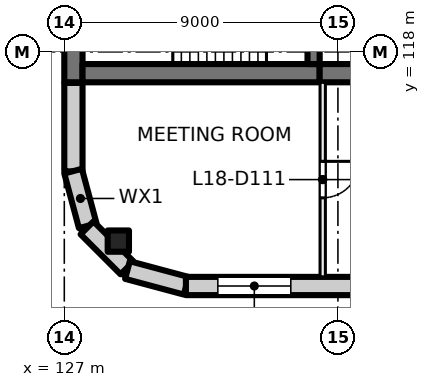
"""IFC4 building model, lengths in metres.
Left out: names, types, materials, properties, quantities, classifications, styles, units other than length and angle.
Written with IfcOpenShell. Run it as: python <this file> out.ifc"""

import sys

from ifc_helpers import new_model, si_unit, direction, frame, frame_2d, origin, origin_2d, place, context, subcontext, project, spatial, rectangle, extrude, element, fill, save


model = new_model("IFC4")
c1 = context("Model", 3, precision=1e-05, world=origin(), true_north=direction((0.0, 1.0)))
c2 = subcontext(c1, "Body", "Model", "MODEL_VIEW")
j1 = project(units=[si_unit("LENGTHUNIT", "METRE"), si_unit("PLANEANGLEUNIT", "RADIAN")], contexts=[c1])
p1 = place(None, origin())
s1 = spatial("IfcSite", under=j1, at=p1, CompositionType="ELEMENT")
p2 = place(p1, origin())
s2 = spatial("IfcBuilding", under=s1, at=p2, CompositionType="ELEMENT")
p3 = place(p2, frame((0.0, 0.0, 81.0)))
s3 = spatial("IfcBuildingStorey", under=s2, at=p3, CompositionType="ELEMENT", Elevation=81.0)
p4 = place(p3, frame((128.777, 111.777, 0.0), z_axis=(0.0, 0.0, 1.0), x_axis=(1.0, 0.0, 0.0)))
e1 = element("IfcColumn", 1, at=p4, inside=s3, PredefinedType="COLUMN", context=c2, shape_type="SweptSolid", body=[
    extrude(rectangle(XDim=0.7, YDim=0.7, at=origin_2d()), origin(), (0.0, 0.0, 1.0), 4.0),
])
p5 = place(p3, frame((127.3, 117.0, 0.0), z_axis=(0.0, 0.0, 1.0), x_axis=(0.0, 1.0, 0.0)))
e2 = element("IfcWall", 2, at=p5, inside=s3, PredefinedType="SHEAR", context=c2, shape_type="SweptSolid", body=[
    extrude(rectangle(XDim=3.8, YDim=0.6, at=frame_2d((1.9, 0.0))), origin(), (0.0, 0.0, 1.0), 4.0),
])
p6 = place(p3, frame((127.6, 117.3, 0.0), z_axis=(0.0, 0.0, 1.0), x_axis=(1.0, 0.0, 0.0)))
e3 = element("IfcWall", 3, at=p6, inside=s3, PredefinedType="SHEAR", context=c2, shape_type="SweptSolid", body=[
    extrude(rectangle(XDim=7.8, YDim=0.6, at=frame_2d((3.9, 0.0))), origin(), (0.0, 0.0, 1.0), 4.0),
])
p7 = place(p3, frame((135.4, 117.3, 0.0), z_axis=(0.0, 0.0, 1.0), x_axis=(1.0, 0.0, 0.0)))
e4 = element("IfcWall", 4, at=p7, inside=s3, PredefinedType="SHEAR", context=c2, shape_type="SweptSolid", body=[
    extrude(rectangle(XDim=4.6, YDim=0.6, at=frame_2d((2.3, 0.0))), origin(), (0.0, 0.0, 1.0), 4.0),
])
p8 = place(p3, frame((135.2, 117.6, 0.0), z_axis=(0.0, 0.0, 1.0), x_axis=(0.0, 1.0, 0.0)))
e5 = element("IfcWall", 5, at=p8, inside=s3, PredefinedType="SHEAR", context=c2, shape_type="SweptSolid", body=[
    extrude(rectangle(XDim=2.8, YDim=0.4, at=frame_2d((1.4, 0.0))), origin(), (0.0, 0.0, 1.0), 4.0),
])
p9 = place(p8, frame((0.9, 0.0, 0.0)))
e6 = element("IfcOpeningElement", 6, at=p9, cuts=e5, PredefinedType="OPENING", context=c2, shape_type="SweptSolid", body=[
    extrude(rectangle(XDim=1.0, YDim=2.1, at=frame_2d((0.5, 1.05))), frame((0.0, 0.21, 0.0), z_axis=(0.0, -1.0, 0.0), x_axis=(1.0, 0.0, 0.0)), (0.0, 0.0, 1.0), 0.42),
])
p10 = place(p3, frame((127.3, 114.07, 0.0), z_axis=(0.0, 0.0, 1.0), x_axis=(0.0, 1.0, 0.0)))
e7 = element("IfcWall", 7, at=p10, inside=s3, PredefinedType="SOLIDWALL", context=c2, shape_type="SweptSolid", body=[
    extrude(rectangle(XDim=2.91, YDim=0.6, at=frame_2d((1.455, 0.0))), origin(), (0.0, 0.0, 1.0), 3.625),
])
for number, where, z_axis, x_axis in (
    (8, (127.771, 112.281, 0.0), (0.0, 0.0, 1.0), (-0.259, 0.966, 0.0)),
    (9, (129.064, 110.896, 0.0), (0.0, 0.0, 1.0), (-0.707, 0.707, 0.0)),
):
    element("IfcWall", number, at=place(p3, frame(where, z_axis=z_axis, x_axis=x_axis)), inside=s3, PredefinedType="SOLIDWALL", context=c2, shape_type="SweptSolid", body=[
        extrude(rectangle(XDim=1.861, YDim=0.6, at=frame_2d((0.93, 0.0))), origin(), (0.0, 0.0, 1.0), 3.625),
    ])
p11 = place(p3, frame((131.01, 110.308, 0.0), z_axis=(0.0, 0.0, 1.0), x_axis=(-0.965920269068, 0.258839784042, 0.0)))
e10 = element("IfcWall", 10, at=p11, inside=s3, PredefinedType="SOLIDWALL", context=c2, shape_type="SweptSolid", body=[
    extrude(rectangle(XDim=2.0, YDim=0.6, at=frame_2d((1.0, 0.0))), origin(), (0.0, 0.0, 1.0), 3.625),
])
p12 = place(p3, frame((162.93, 110.3, 0.0), z_axis=(0.0, 0.0, 1.0), x_axis=(-1.0, 0.0, 0.0)))
e11 = element("IfcWall", 11, at=p12, inside=s3, PredefinedType="SOLIDWALL", context=c2, shape_type="SweptSolid", body=[
    extrude(rectangle(XDim=31.93, YDim=0.6, at=frame_2d((15.965, 0.0))), origin(), (0.0, 0.0, 1.0), 3.625),
])
p13 = place(p12, frame((1.48, 0.0, 0.9)))
e12 = element("IfcOpeningElement", 12, at=p13, cuts=e11, PredefinedType="OPENING", context=c2, shape_type="SweptSolid", body=[
    extrude(rectangle(XDim=2.4, YDim=2.4, at=frame_2d((1.2, 1.2))), frame((0.0, 0.31, 0.0), z_axis=(0.0, -1.0, 0.0), x_axis=(1.0, 0.0, 0.0)), (0.0, 0.0, 1.0), 0.62),
])
p14 = place(p12, frame((5.98, 0.0, 0.9)))
e13 = element("IfcOpeningElement", 13, at=p14, cuts=e11, PredefinedType="OPENING", context=c2, shape_type="SweptSolid", body=[
    extrude(rectangle(XDim=2.4, YDim=2.4, at=frame_2d((1.2, 1.2))), frame((0.0, 0.31, 0.0), z_axis=(0.0, -1.0, 0.0), x_axis=(1.0, 0.0, 0.0)), (0.0, 0.0, 1.0), 0.62),
])
p15 = place(p12, frame((10.48, 0.0, 0.9)))
e14 = element("IfcOpeningElement", 14, at=p15, cuts=e11, PredefinedType="OPENING", context=c2, shape_type="SweptSolid", body=[
    extrude(rectangle(XDim=2.4, YDim=2.4, at=frame_2d((1.2, 1.2))), frame((0.0, 0.31, 0.0), z_axis=(0.0, -1.0, 0.0), x_axis=(1.0, 0.0, 0.0)), (0.0, 0.0, 1.0), 0.62),
])
p16 = place(p12, frame((14.98, 0.0, 0.9)))
e15 = element("IfcOpeningElement", 15, at=p16, cuts=e11, PredefinedType="OPENING", context=c2, shape_type="SweptSolid", body=[
    extrude(rectangle(XDim=2.4, YDim=2.4, at=frame_2d((1.2, 1.2))), frame((0.0, 0.31, 0.0), z_axis=(0.0, -1.0, 0.0), x_axis=(1.0, 0.0, 0.0)), (0.0, 0.0, 1.0), 0.62),
])
p17 = place(p12, frame((19.48, 0.0, 0.9)))
e16 = element("IfcOpeningElement", 16, at=p17, cuts=e11, PredefinedType="OPENING", context=c2, shape_type="SweptSolid", body=[
    extrude(rectangle(XDim=2.4, YDim=2.4, at=frame_2d((1.2, 1.2))), frame((0.0, 0.31, 0.0), z_axis=(0.0, -1.0, 0.0), x_axis=(1.0, 0.0, 0.0)), (0.0, 0.0, 1.0), 0.62),
])
p18 = place(p12, frame((23.98, 0.0, 0.9)))
e17 = element("IfcOpeningElement", 17, at=p18, cuts=e11, PredefinedType="OPENING", context=c2, shape_type="SweptSolid", body=[
    extrude(rectangle(XDim=2.4, YDim=2.4, at=frame_2d((1.2, 1.2))), frame((0.0, 0.31, 0.0), z_axis=(0.0, -1.0, 0.0), x_axis=(1.0, 0.0, 0.0)), (0.0, 0.0, 1.0), 0.62),
])
p19 = place(p12, frame((28.48, 0.0, 0.9)))
e18 = element("IfcOpeningElement", 18, at=p19, cuts=e11, PredefinedType="OPENING", context=c2, shape_type="SweptSolid", body=[
    extrude(rectangle(XDim=2.4, YDim=2.4, at=frame_2d((1.2, 1.2))), frame((0.0, 0.31, 0.0), z_axis=(0.0, -1.0, 0.0), x_axis=(1.0, 0.0, 0.0)), (0.0, 0.0, 1.0), 0.62),
])
p20 = place(p3, frame((135.5, 117.0, 0.0), z_axis=(0.0, 0.0, 1.0), x_axis=(0.0, -1.0, 0.0)))
e19 = element("IfcWall", 19, at=p20, inside=s3, PredefinedType="PARTITIONING", context=c2, shape_type="SweptSolid", body=[
    extrude(rectangle(XDim=6.4, YDim=0.175, at=frame_2d((3.2, 0.0))), origin(), (0.0, 0.0, 1.0), 3.625),
])
p21 = place(p20, frame((2.6, 0.0, 0.0)))
e20 = element("IfcOpeningElement", 20, at=p21, cuts=e19, PredefinedType="OPENING", context=c2, shape_type="SweptSolid", body=[
    extrude(rectangle(XDim=1.2, YDim=2.1, at=frame_2d((0.6, 1.05))), frame((0.0, 0.097, 0.0), z_axis=(0.0, -1.0, 0.0), x_axis=(1.0, 0.0, 0.0)), (0.0, 0.0, 1.0), 0.195),
])
p22 = place(p19, origin())
e21 = element("IfcWindow", 21, at=p22, inside=s3, PartitioningType="SINGLE_PANEL", PredefinedType="WINDOW", context=c2, shape_type="SweptSolid", body=[
    extrude(rectangle(XDim=2.4, YDim=2.4, at=frame_2d((1.2, 1.2))), frame((0.0, 0.03, 0.0), z_axis=(0.0, -1.0, 0.0), x_axis=(1.0, 0.0, 0.0)), (0.0, 0.0, 1.0), 0.06),
])
fill(e18, e21)
p23 = place(p21, origin())
e22 = element("IfcDoor", 22, at=p23, inside=s3, OperationType="DOUBLE_DOOR_SINGLE_SWING", PredefinedType="DOOR", context=c2, shape_type="SweptSolid", body=[
    extrude(rectangle(XDim=1.2, YDim=2.1, at=frame_2d((0.6, 1.05))), frame((0.0, 0.025, 0.0), z_axis=(0.0, -1.0, 0.0), x_axis=(1.0, 0.0, 0.0)), (0.0, 0.0, 1.0), 0.05),
])
fill(e20, e22)
save(model, sys.argv[1])
